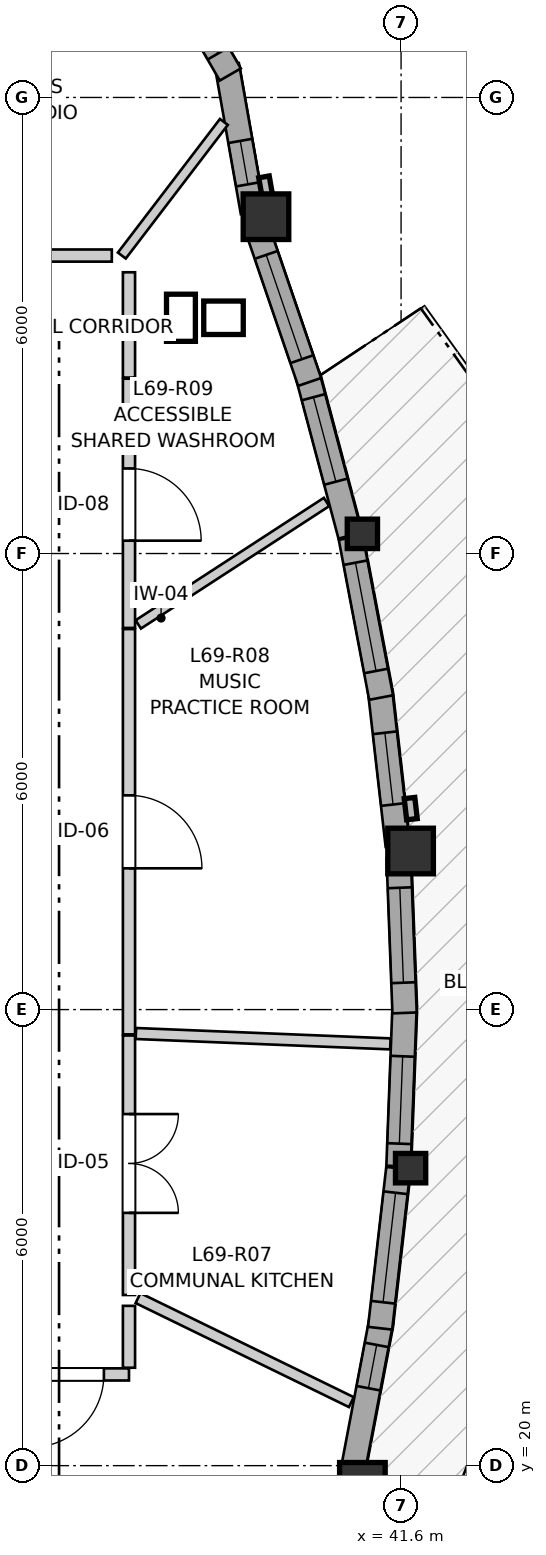
"""IFC4 building model, lengths in metres.
Left out: names, types, materials, properties, quantities, classifications, styles, units other than length and angle.
Written with IfcOpenShell. Run it as: python <this file> out.ifc"""

import sys

from ifc_helpers import new_model, si_unit, direction, frame, frame_2d, origin, origin_2d, place, context, subcontext, project, spatial, rectangle, i_section, extrude, source, transform, mapped, element, fill, save


model = new_model("IFC4")
c1 = context("Model", 3, precision=1e-05, world=origin(), true_north=direction((0.0, 1.0)))
c2 = subcontext(c1, "Body", "Model", "MODEL_VIEW")
j1 = project(units=[si_unit("LENGTHUNIT", "METRE"), si_unit("PLANEANGLEUNIT", "RADIAN")], contexts=[c1])
p1 = place(None, origin())
s1 = spatial("IfcSite", under=j1, at=p1, CompositionType="ELEMENT")
p2 = place(p1, origin())
s2 = spatial("IfcBuilding", under=s1, at=p2, CompositionType="ELEMENT")
p3 = place(p2, frame((0.0, 0.0, 230.8)))
s3 = spatial("IfcBuildingStorey", under=s2, at=p3, CompositionType="ELEMENT", Elevation=230.8)
m1 = source(origin(), c2, "Body", "SweptSolid", [
    extrude(rectangle(XDim=0.6, YDim=0.6, at=origin_2d()), origin(), (0.0, 0.0, 1.0), 2.96),
])
p4 = place(p3, frame((41.091, 19.741, 0.0), z_axis=(0.0, 0.0, 1.0), x_axis=(1.0, 0.0, 0.0)))
e1 = element("IfcColumn", 1, at=p4, inside=s3, PredefinedType="COLUMN", context=c2, shape_type="MappedRepresentation", body=[
    mapped(m1, transform((0.0, 0.0, 0.0), x_axis=(1.0, 0.0, 0.0), y_axis=(0.0, 1.0, 0.0), z_axis=(0.0, 0.0, 1.0), scale=1.0)),
])
m2 = source(origin(), c2, "Body", "SweptSolid", [
    extrude(i_section(OverallWidth=0.398, OverallDepth=0.387, WebThickness=0.019, FlangeThickness=0.03, FilletRadius=0.015, at=origin_2d()), origin(), (0.0, 0.0, 1.0), 2.96),
])
p5 = place(p3, frame((41.725, 23.914, 0.0), z_axis=(0.0, 0.0, 1.0), x_axis=(1.0, 0.0, 0.0)))
e2 = element("IfcColumn", 2, at=p5, inside=s3, PredefinedType="PILASTER", context=c2, shape_type="MappedRepresentation", body=[
    mapped(m2, transform((0.0, 0.0, 0.0), x_axis=(1.0, 0.0, 0.0), y_axis=(0.0, 1.0, 0.0), z_axis=(0.0, 0.0, 1.0), scale=1.0)),
])
p6 = place(p3, frame((41.725, 28.086, 0.0), z_axis=(0.0, 0.0, 1.0), x_axis=(1.0, 0.0, 0.0)))
e3 = element("IfcColumn", 3, at=p6, inside=s3, PredefinedType="COLUMN", context=c2, shape_type="MappedRepresentation", body=[
    mapped(m1, transform((0.0, 0.0, 0.0), x_axis=(1.0, 0.0, 0.0), y_axis=(0.0, 1.0, 0.0), z_axis=(0.0, 0.0, 1.0), scale=1.0)),
])
p7 = place(p3, frame((41.091, 32.259, 0.0), z_axis=(0.0, 0.0, 1.0), x_axis=(1.0, 0.0, 0.0)))
e4 = element("IfcColumn", 4, at=p7, inside=s3, PredefinedType="PILASTER", context=c2, shape_type="MappedRepresentation", body=[
    mapped(m2, transform((0.0, 0.0, 0.0), x_axis=(1.0, 0.0, 0.0), y_axis=(0.0, 1.0, 0.0), z_axis=(0.0, 0.0, 1.0), scale=1.0)),
])
p8 = place(p3, frame((39.823, 36.431, 0.0), z_axis=(0.0, 0.0, 1.0), x_axis=(1.0, 0.0, 0.0)))
e5 = element("IfcColumn", 5, at=p8, inside=s3, PredefinedType="COLUMN", context=c2, shape_type="MappedRepresentation", body=[
    mapped(m1, transform((0.0, 0.0, 0.0), x_axis=(1.0, 0.0, 0.0), y_axis=(0.0, 1.0, 0.0), z_axis=(0.0, 0.0, 1.0), scale=1.0)),
])
p9 = place(p3, frame((40.95, 19.86, 0.0), z_axis=(0.0, 0.0, 1.0), x_axis=(0.18667884524, 0.982420993638, 0.0)))
e6 = element("IfcWall", 6, at=p9, inside=s3, PredefinedType="SOLIDWALL", context=c2, shape_type="SweptSolid", body=[
    extrude(rectangle(XDim=2.072, YDim=0.32, at=frame_2d((1.036, 0.0))), origin(), (0.0, 0.0, 1.0), 2.58),
])
p10 = place(p9, frame((1.18, 0.0, 0.82)))
e7 = element("IfcOpeningElement", 7, at=p10, cuts=e6, PredefinedType="OPENING", context=c2, shape_type="SweptSolid", body=[
    extrude(rectangle(XDim=0.58, YDim=1.35, at=frame_2d((0.29, 0.675))), frame((0.0, 0.17, 0.0), z_axis=(0.0, -1.0, 0.0), x_axis=(1.0, 0.0, 0.0)), (0.0, 0.0, 1.0), 0.34),
])
p11 = place(p3, frame((41.324, 21.808, 0.0), z_axis=(0.0, 0.0, 1.0), x_axis=(0.113315758547, 0.993559026362, 0.0)))
e8 = element("IfcWall", 8, at=p11, inside=s3, PredefinedType="SOLIDWALL", context=c2, shape_type="SweptSolid", body=[
    extrude(rectangle(XDim=2.118, YDim=0.32, at=frame_2d((1.059, 0.0))), origin(), (0.0, 0.0, 1.0), 2.58),
])
p12 = place(p11, frame((0.344, 0.0, 0.82)))
e9 = element("IfcOpeningElement", 9, at=p12, cuts=e8, PredefinedType="OPENING", context=c2, shape_type="SweptSolid", body=[
    extrude(rectangle(XDim=1.45, YDim=1.25, at=frame_2d((0.725, 0.625))), frame((0.0, 0.17, 0.0), z_axis=(0.0, -1.0, 0.0), x_axis=(1.0, 0.0, 0.0)), (0.0, 0.0, 1.0), 0.34),
])
p13 = place(p3, frame((41.566, 23.94, 0.0), z_axis=(0.0, 0.0, 1.0), x_axis=(0.037912160544, 0.999281075615, 0.0)))
e10 = element("IfcWall", 10, at=p13, inside=s3, PredefinedType="SOLIDWALL", context=c2, shape_type="SweptSolid", body=[
    extrude(rectangle(XDim=2.106, YDim=0.32, at=frame_2d((1.053, 0.0))), origin(), (0.0, 0.0, 1.0), 2.58),
])
p14 = place(p13, frame((0.297, 0.0, 0.82)))
e11 = element("IfcOpeningElement", 11, at=p14, cuts=e10, PredefinedType="OPENING", context=c2, shape_type="SweptSolid", body=[
    extrude(rectangle(XDim=1.15, YDim=1.2, at=frame_2d((0.575, 0.6))), frame((0.0, 0.17, 0.0), z_axis=(0.0, -1.0, 0.0), x_axis=(1.0, 0.0, 0.0)), (0.0, 0.0, 1.0), 0.34),
])
p15 = place(p3, frame((41.646, 25.956, 0.0), z_axis=(0.0, 0.0, 1.0), x_axis=(-0.038018581285, 0.999277032397, 0.0)))
e12 = element("IfcWall", 12, at=p15, inside=s3, PredefinedType="SOLIDWALL", context=c2, shape_type="SweptSolid", body=[
    extrude(rectangle(XDim=2.036, YDim=0.32, at=frame_2d((1.018, 0.0))), origin(), (0.0, 0.0, 1.0), 2.58),
])
p16 = place(p15, frame((0.398, 0.0, 0.82)))
e13 = element("IfcOpeningElement", 13, at=p16, cuts=e12, PredefinedType="OPENING", context=c2, shape_type="SweptSolid", body=[
    extrude(rectangle(XDim=1.25, YDim=1.35, at=frame_2d((0.625, 0.675))), frame((0.0, 0.17, 0.0), z_axis=(0.0, -1.0, 0.0), x_axis=(1.0, 0.0, 0.0)), (0.0, 0.0, 1.0), 0.34),
])
p17 = place(p3, frame((41.556, 28.158, 0.0), z_axis=(0.0, 0.0, 1.0), x_axis=(-0.113270843693, 0.993564147888, 0.0)))
e14 = element("IfcWall", 14, at=p17, inside=s3, PredefinedType="SOLIDWALL", context=c2, shape_type="SweptSolid", body=[
    extrude(rectangle(XDim=2.048, YDim=0.32, at=frame_2d((1.024, 0.0))), origin(), (0.0, 0.0, 1.0), 2.58),
])
p18 = place(p17, frame((0.544, 0.0, 0.82)))
e15 = element("IfcOpeningElement", 15, at=p18, cuts=e14, PredefinedType="OPENING", context=c2, shape_type="SweptSolid", body=[
    extrude(rectangle(XDim=0.95, YDim=1.35, at=frame_2d((0.475, 0.675))), frame((0.0, 0.17, 0.0), z_axis=(0.0, -1.0, 0.0), x_axis=(1.0, 0.0, 0.0)), (0.0, 0.0, 1.0), 0.34),
])
p19 = place(p3, frame((41.337, 30.105, 0.0), z_axis=(0.0, 0.0, 1.0), x_axis=(-0.186614434744, 0.98243323068, 0.0)))
e16 = element("IfcWall", 16, at=p19, inside=s3, PredefinedType="SOLIDWALL", context=c2, shape_type="SweptSolid", body=[
    extrude(rectangle(XDim=2.142, YDim=0.32, at=frame_2d((1.071, 0.0))), origin(), (0.0, 0.0, 1.0), 2.58),
])
p20 = place(p19, frame((0.356, 0.0, 0.82)))
e17 = element("IfcOpeningElement", 17, at=p20, cuts=e16, PredefinedType="OPENING", context=c2, shape_type="SweptSolid", body=[
    extrude(rectangle(XDim=1.45, YDim=1.25, at=frame_2d((0.725, 0.625))), frame((0.0, 0.17, 0.0), z_axis=(0.0, -1.0, 0.0), x_axis=(1.0, 0.0, 0.0)), (0.0, 0.0, 1.0), 0.34),
])
p21 = place(p3, frame((40.931, 32.237, 0.0), z_axis=(0.0, 0.0, 1.0), x_axis=(-0.257076193941, 0.966391137433, 0.0)))
e18 = element("IfcWall", 18, at=p21, inside=s3, PredefinedType="SOLIDWALL", context=c2, shape_type="SweptSolid", body=[
    extrude(rectangle(XDim=2.177, YDim=0.32, at=frame_2d((1.088, 0.0))), origin(), (0.0, 0.0, 1.0), 2.58),
])
p22 = place(p21, frame((0.733, 0.0, 0.82)))
e19 = element("IfcOpeningElement", 19, at=p22, cuts=e18, PredefinedType="OPENING", context=c2, shape_type="SweptSolid", body=[
    extrude(rectangle(XDim=1.15, YDim=1.2, at=frame_2d((0.575, 0.6))), frame((0.0, 0.17, 0.0), z_axis=(0.0, -1.0, 0.0), x_axis=(1.0, 0.0, 0.0)), (0.0, 0.0, 1.0), 0.34),
])
p23 = place(p3, frame((40.397, 34.257, 0.0), z_axis=(0.0, 0.0, 1.0), x_axis=(-0.323634249216, 0.9461822619, 0.0)))
e20 = element("IfcWall", 20, at=p23, inside=s3, PredefinedType="SOLIDWALL", context=c2, shape_type="SweptSolid", body=[
    extrude(rectangle(XDim=2.153, YDim=0.32, at=frame_2d((1.077, 0.0))), origin(), (0.0, 0.0, 1.0), 2.58),
])
p24 = place(p23, frame((0.316, 0.0, 0.82)))
e21 = element("IfcOpeningElement", 21, at=p24, cuts=e20, PredefinedType="OPENING", context=c2, shape_type="SweptSolid", body=[
    extrude(rectangle(XDim=1.45, YDim=1.25, at=frame_2d((0.725, 0.625))), frame((0.0, 0.17, 0.0), z_axis=(0.0, -1.0, 0.0), x_axis=(1.0, 0.0, 0.0)), (0.0, 0.0, 1.0), 0.34),
])
p25 = place(p3, frame((39.649, 36.492, 0.0), z_axis=(0.0, 0.0, 1.0), x_axis=(-0.173693060482, 0.984799837906, 0.0)))
e22 = element("IfcWall", 22, at=p25, inside=s3, PredefinedType="SOLIDWALL", context=c2, shape_type="SweptSolid", body=[
    extrude(rectangle(XDim=1.962, YDim=0.32, at=frame_2d((0.981, 0.0))), origin(), (0.0, 0.0, 1.0), 2.58),
])
p26 = place(p25, frame((0.371, 0.0, 0.82)))
e23 = element("IfcOpeningElement", 23, at=p26, cuts=e22, PredefinedType="OPENING", context=c2, shape_type="SweptSolid", body=[
    extrude(rectangle(XDim=0.58, YDim=1.35, at=frame_2d((0.29, 0.675))), frame((0.0, 0.17, 0.0), z_axis=(0.0, -1.0, 0.0), x_axis=(1.0, 0.0, 0.0)), (0.0, 0.0, 1.0), 0.34),
])
p27 = place(p3, frame((39.353, 38.302, 0.0), z_axis=(0.0, 0.0, 1.0), x_axis=(-0.49990781971, 0.866078617559, 0.0)))
e24 = element("IfcWall", 24, at=p27, inside=s3, PredefinedType="SOLIDWALL", context=c2, shape_type="SweptSolid", body=[
    extrude(rectangle(XDim=2.09, YDim=0.32, at=frame_2d((1.045, 0.0))), origin(), (0.0, 0.0, 1.0), 2.58),
])
p28 = place(p27, frame((0.32, 0.0, 0.82)))
e25 = element("IfcOpeningElement", 25, at=p28, cuts=e24, PredefinedType="OPENING", context=c2, shape_type="SweptSolid", body=[
    extrude(rectangle(XDim=1.45, YDim=1.25, at=frame_2d((0.725, 0.625))), frame((0.0, 0.17, 0.0), z_axis=(0.0, -1.0, 0.0), x_axis=(1.0, 0.0, 0.0)), (0.0, 0.0, 1.0), 0.34),
])
p29 = place(p3, frame((38.02, 31.006, 0.0), z_axis=(0.0, 0.0, 1.0), x_axis=(0.0, -1.0, 0.0)))
e26 = element("IfcWall", 26, at=p29, inside=s3, PredefinedType="PARTITIONING", context=c2, shape_type="SweptSolid", body=[
    extrude(rectangle(XDim=5.332, YDim=0.16, at=frame_2d((2.666, 0.0))), origin(), (0.0, 0.0, 1.0), 2.628),
])
p30 = place(p29, frame((2.188, 0.0, 0.0)))
e27 = element("IfcOpeningElement", 27, at=p30, cuts=e26, PredefinedType="OPENING", context=c2, shape_type="SweptSolid", body=[
    extrude(rectangle(XDim=0.96, YDim=2.1, at=frame_2d((0.48, 1.05))), frame((0.0, 0.09, 0.0), z_axis=(0.0, -1.0, 0.0), x_axis=(1.0, 0.0, 0.0)), (0.0, 0.0, 1.0), 0.18),
])
p31 = place(p3, frame((38.02, 25.659, 0.0), z_axis=(0.0, 0.0, 1.0), x_axis=(0.0, -1.0, 0.0)))
e28 = element("IfcWall", 28, at=p31, inside=s3, PredefinedType="PARTITIONING", context=c2, shape_type="SweptSolid", body=[
    extrude(rectangle(XDim=3.414, YDim=0.16, at=frame_2d((1.707, 0.0))), origin(), (0.0, 0.0, 1.0), 2.628),
])
p32 = place(p31, frame((1.033, 0.0, 0.0)))
e29 = element("IfcOpeningElement", 29, at=p32, cuts=e28, PredefinedType="OPENING", context=c2, shape_type="SweptSolid", body=[
    extrude(rectangle(XDim=1.3, YDim=2.1, at=frame_2d((0.65, 1.05))), frame((0.0, 0.09, 0.0), z_axis=(0.0, -1.0, 0.0), x_axis=(1.0, 0.0, 0.0)), (0.0, 0.0, 1.0), 0.18),
])
p33 = place(p3, frame((38.02, 34.3, 0.0), z_axis=(0.0, 0.0, 1.0), x_axis=(0.0, -1.0, 0.0)))
e30 = element("IfcWall", 30, at=p33, inside=s3, PredefinedType="PARTITIONING", context=c2, shape_type="SweptSolid", body=[
    extrude(rectangle(XDim=3.279, YDim=0.16, at=frame_2d((1.64, 0.0))), origin(), (0.0, 0.0, 1.0), 2.628),
])
p34 = place(p33, frame((1.181, 0.0, 0.0)))
e31 = element("IfcOpeningElement", 31, at=p34, cuts=e30, PredefinedType="OPENING", context=c2, shape_type="SweptSolid", body=[
    extrude(rectangle(XDim=0.95, YDim=2.1, at=frame_2d((0.475, 1.05))), frame((0.0, 0.09, 0.0), z_axis=(0.0, -1.0, 0.0), x_axis=(1.0, 0.0, 0.0)), (0.0, 0.0, 1.0), 0.18),
])
p35 = place(p3, frame((38.02, 21.2, 0.0), z_axis=(0.0, 0.0, 1.0), x_axis=(-1.0, 0.0, 0.0)))
e32 = element("IfcWall", 32, at=p35, inside=s3, PredefinedType="PARTITIONING", context=c2, shape_type="SweptSolid", body=[
    extrude(rectangle(XDim=1.612, YDim=0.16, at=frame_2d((0.806, 0.0))), origin(), (0.0, 0.0, 1.0), 2.96),
])
p36 = place(p35, frame((0.33, 0.0, 0.0)))
e33 = element("IfcOpeningElement", 33, at=p36, cuts=e32, PredefinedType="OPENING", context=c2, shape_type="SweptSolid", body=[
    extrude(rectangle(XDim=0.96, YDim=2.1, at=frame_2d((0.48, 1.05))), frame((0.0, 0.09, 0.0), z_axis=(0.0, -1.0, 0.0), x_axis=(1.0, 0.0, 0.0)), (0.0, 0.0, 1.0), 0.18),
])
p37 = place(p3, frame((38.111, 25.685, 0.0), z_axis=(0.0, 0.0, 1.0), x_axis=(0.999167325882, -0.040800182477, 0.0)))
e34 = element("IfcWall", 34, at=p37, inside=s3, PredefinedType="PARTITIONING", context=c2, shape_type="SweptSolid", body=[
    extrude(rectangle(XDim=3.351, YDim=0.145, at=frame_2d((1.675, 0.0))), origin(), (0.0, 0.0, 1.0), 2.96),
])
p38 = place(p3, frame((38.139, 22.204, 0.0), z_axis=(0.0, 0.0, 1.0), x_axis=(0.898869860356, -0.43821567081, 0.0)))
e35 = element("IfcWall", 35, at=p38, inside=s3, PredefinedType="PARTITIONING", context=c2, shape_type="SweptSolid", body=[
    extrude(rectangle(XDim=3.123, YDim=0.145, at=frame_2d((1.562, 0.0))), origin(), (0.0, 0.0, 1.0), 2.96),
])
p39 = place(p3, frame((38.142, 31.067, 0.0), z_axis=(0.0, 0.0, 1.0), x_axis=(0.838351109823, 0.545130641827, 0.0)))
e36 = element("IfcWall", 36, at=p39, inside=s3, PredefinedType="PARTITIONING", context=c2, shape_type="SweptSolid", body=[
    extrude(rectangle(XDim=2.955, YDim=0.13, at=frame_2d((1.478, 0.0))), origin(), (0.0, 0.0, 1.0), 2.96),
])
p40 = place(p3, frame((37.926, 35.92, 0.0), z_axis=(0.0, 0.0, 1.0), x_axis=(0.606987113509, 0.794711673523, 0.0)))
e37 = element("IfcWall", 37, at=p40, inside=s3, PredefinedType="PARTITIONING", context=c2, shape_type="SweptSolid", body=[
    extrude(rectangle(XDim=2.212, YDim=0.13, at=frame_2d((1.106, 0.0))), origin(), (0.0, 0.0, 1.0), 2.96),
])
p41 = place(p3, frame((38.02, 34.315, 0.0), z_axis=(0.0, 0.0, 1.0), x_axis=(0.0, 1.0, 0.0)))
e38 = element("IfcWall", 38, at=p41, inside=s3, PredefinedType="PARTITIONING", context=c2, shape_type="SweptSolid", body=[
    extrude(rectangle(XDim=1.385, YDim=0.16, at=frame_2d((0.693, 0.0))), origin(), (0.0, 0.0, 1.0), 2.96),
])
p42 = place(p3, frame((36.415, 35.92, 0.0), z_axis=(0.0, 0.0, 1.0), x_axis=(1.0, 0.0, 0.0)))
e39 = element("IfcWall", 39, at=p42, inside=s3, PredefinedType="PARTITIONING", context=c2, shape_type="SweptSolid", body=[
    extrude(rectangle(XDim=1.379, YDim=0.16, at=frame_2d((0.689, 0.0))), origin(), (0.0, 0.0, 1.0), 2.598),
])
p43 = place(p3, frame((38.02, 21.288, 0.0), z_axis=(0.0, 0.0, 1.0), x_axis=(0.0, 1.0, 0.0)))
e40 = element("IfcWall", 40, at=p43, inside=s3, PredefinedType="PARTITIONING", context=c2, shape_type="SweptSolid", body=[
    extrude(rectangle(XDim=0.814, YDim=0.16, at=frame_2d((0.407, 0.0))), origin(), (0.0, 0.0, 1.0), 2.628),
])
m3 = source(origin(), c2, "Body", "SweptSolid", [
    extrude(rectangle(XDim=0.58, YDim=1.35, at=frame_2d((0.29, 0.675))), frame((0.0, 0.03, 0.0), z_axis=(0.0, -1.0, 0.0), x_axis=(1.0, 0.0, 0.0)), (0.0, 0.0, 1.0), 0.06),
])
p44 = place(p10, origin())
e41 = element("IfcWindow", 41, at=p44, inside=s3, PartitioningType="SINGLE_PANEL", PredefinedType="WINDOW", context=c2, shape_type="MappedRepresentation", body=[
    mapped(m3, transform((0.0, 0.0, 0.0), x_axis=(1.0, 0.0, 0.0), y_axis=(0.0, 1.0, 0.0), z_axis=(0.0, 0.0, 1.0), scale=1.0)),
])
fill(e7, e41)
m4 = source(origin(), c2, "Body", "SweptSolid", [
    extrude(rectangle(XDim=1.45, YDim=1.25, at=frame_2d((0.725, 0.625))), frame((0.0, 0.03, 0.0), z_axis=(0.0, -1.0, 0.0), x_axis=(1.0, 0.0, 0.0)), (0.0, 0.0, 1.0), 0.06),
])
p45 = place(p12, origin())
e42 = element("IfcWindow", 42, at=p45, inside=s3, PartitioningType="SINGLE_PANEL", PredefinedType="WINDOW", context=c2, shape_type="MappedRepresentation", body=[
    mapped(m4, transform((0.0, 0.0, 0.0), x_axis=(1.0, 0.0, 0.0), y_axis=(0.0, 1.0, 0.0), z_axis=(0.0, 0.0, 1.0), scale=1.0)),
])
fill(e9, e42)
m5 = source(origin(), c2, "Body", "SweptSolid", [
    extrude(rectangle(XDim=1.15, YDim=1.2, at=frame_2d((0.575, 0.6))), frame((0.0, 0.03, 0.0), z_axis=(0.0, -1.0, 0.0), x_axis=(1.0, 0.0, 0.0)), (0.0, 0.0, 1.0), 0.06),
])
p46 = place(p14, origin())
e43 = element("IfcWindow", 43, at=p46, inside=s3, PartitioningType="SINGLE_PANEL", PredefinedType="WINDOW", context=c2, shape_type="MappedRepresentation", body=[
    mapped(m5, transform((0.0, 0.0, 0.0), x_axis=(1.0, 0.0, 0.0), y_axis=(0.0, 1.0, 0.0), z_axis=(0.0, 0.0, 1.0), scale=1.0)),
])
fill(e11, e43)
m6 = source(origin(), c2, "Body", "SweptSolid", [
    extrude(rectangle(XDim=1.25, YDim=1.35, at=frame_2d((0.625, 0.675))), frame((0.0, 0.03, 0.0), z_axis=(0.0, -1.0, 0.0), x_axis=(1.0, 0.0, 0.0)), (0.0, 0.0, 1.0), 0.06),
])
p47 = place(p16, origin())
e44 = element("IfcWindow", 44, at=p47, inside=s3, PartitioningType="SINGLE_PANEL", PredefinedType="WINDOW", context=c2, shape_type="MappedRepresentation", body=[
    mapped(m6, transform((0.0, 0.0, 0.0), x_axis=(1.0, 0.0, 0.0), y_axis=(0.0, 1.0, 0.0), z_axis=(0.0, 0.0, 1.0), scale=1.0)),
])
fill(e13, e44)
m7 = source(origin(), c2, "Body", "SweptSolid", [
    extrude(rectangle(XDim=0.95, YDim=1.35, at=frame_2d((0.475, 0.675))), frame((0.0, 0.03, 0.0), z_axis=(0.0, -1.0, 0.0), x_axis=(1.0, 0.0, 0.0)), (0.0, 0.0, 1.0), 0.06),
])
p48 = place(p18, origin())
e45 = element("IfcWindow", 45, at=p48, inside=s3, PartitioningType="SINGLE_PANEL", PredefinedType="WINDOW", context=c2, shape_type="MappedRepresentation", body=[
    mapped(m7, transform((0.0, 0.0, 0.0), x_axis=(1.0, 0.0, 0.0), y_axis=(0.0, 1.0, 0.0), z_axis=(0.0, 0.0, 1.0), scale=1.0)),
])
fill(e15, e45)
p49 = place(p20, origin())
e46 = element("IfcWindow", 46, at=p49, inside=s3, PartitioningType="SINGLE_PANEL", PredefinedType="WINDOW", context=c2, shape_type="MappedRepresentation", body=[
    mapped(m4, transform((0.0, 0.0, 0.0), x_axis=(1.0, 0.0, 0.0), y_axis=(0.0, 1.0, 0.0), z_axis=(0.0, 0.0, 1.0), scale=1.0)),
])
fill(e17, e46)
p50 = place(p22, origin())
e47 = element("IfcWindow", 47, at=p50, inside=s3, PartitioningType="SINGLE_PANEL", PredefinedType="WINDOW", context=c2, shape_type="MappedRepresentation", body=[
    mapped(m5, transform((0.0, 0.0, 0.0), x_axis=(1.0, 0.0, 0.0), y_axis=(0.0, 1.0, 0.0), z_axis=(0.0, 0.0, 1.0), scale=1.0)),
])
fill(e19, e47)
p51 = place(p24, origin())
e48 = element("IfcWindow", 48, at=p51, inside=s3, PartitioningType="SINGLE_PANEL", PredefinedType="WINDOW", context=c2, shape_type="MappedRepresentation", body=[
    mapped(m4, transform((0.0, 0.0, 0.0), x_axis=(1.0, 0.0, 0.0), y_axis=(0.0, 1.0, 0.0), z_axis=(0.0, 0.0, 1.0), scale=1.0)),
])
fill(e21, e48)
p52 = place(p26, origin())
e49 = element("IfcWindow", 49, at=p52, inside=s3, PartitioningType="SINGLE_PANEL", PredefinedType="WINDOW", context=c2, shape_type="MappedRepresentation", body=[
    mapped(m3, transform((0.0, 0.0, 0.0), x_axis=(1.0, 0.0, 0.0), y_axis=(0.0, 1.0, 0.0), z_axis=(0.0, 0.0, 1.0), scale=1.0)),
])
fill(e23, e49)
p53 = place(p28, origin())
e50 = element("IfcWindow", 50, at=p53, inside=s3, PartitioningType="SINGLE_PANEL", PredefinedType="WINDOW", context=c2, shape_type="MappedRepresentation", body=[
    mapped(m4, transform((0.0, 0.0, 0.0), x_axis=(1.0, 0.0, 0.0), y_axis=(0.0, 1.0, 0.0), z_axis=(0.0, 0.0, 1.0), scale=1.0)),
])
fill(e25, e50)
m8 = source(origin(), c2, "Body", "SweptSolid", [
    extrude(rectangle(XDim=0.96, YDim=2.1, at=frame_2d((0.48, 1.05))), frame((0.0, 0.025, 0.0), z_axis=(0.0, -1.0, 0.0), x_axis=(1.0, 0.0, 0.0)), (0.0, 0.0, 1.0), 0.05),
])
p54 = place(p30, origin())
e51 = element("IfcDoor", 51, at=p54, inside=s3, OperationType="SINGLE_SWING_RIGHT", PredefinedType="DOOR", context=c2, shape_type="MappedRepresentation", body=[
    mapped(m8, transform((0.0, 0.0, 0.0), x_axis=(1.0, 0.0, 0.0), y_axis=(0.0, 1.0, 0.0), z_axis=(0.0, 0.0, 1.0), scale=1.0)),
])
fill(e27, e51)
m9 = source(origin(), c2, "Body", "SweptSolid", [
    extrude(rectangle(XDim=1.3, YDim=2.1, at=frame_2d((0.65, 1.05))), frame((0.0, 0.025, 0.0), z_axis=(0.0, -1.0, 0.0), x_axis=(1.0, 0.0, 0.0)), (0.0, 0.0, 1.0), 0.05),
])
p55 = place(p32, origin())
e52 = element("IfcDoor", 52, at=p55, inside=s3, OperationType="DOUBLE_DOOR_SINGLE_SWING", PredefinedType="DOOR", context=c2, shape_type="MappedRepresentation", body=[
    mapped(m9, transform((0.0, 0.0, 0.0), x_axis=(1.0, 0.0, 0.0), y_axis=(0.0, 1.0, 0.0), z_axis=(0.0, 0.0, 1.0), scale=1.0)),
])
fill(e29, e52)
m10 = source(origin(), c2, "Body", "SweptSolid", [
    extrude(rectangle(XDim=0.95, YDim=2.1, at=frame_2d((0.475, 1.05))), frame((0.0, 0.025, 0.0), z_axis=(0.0, -1.0, 0.0), x_axis=(1.0, 0.0, 0.0)), (0.0, 0.0, 1.0), 0.05),
])
p56 = place(p34, origin())
e53 = element("IfcDoor", 53, at=p56, inside=s3, OperationType="SINGLE_SWING_RIGHT", PredefinedType="DOOR", context=c2, shape_type="MappedRepresentation", body=[
    mapped(m10, transform((0.0, 0.0, 0.0), x_axis=(1.0, 0.0, 0.0), y_axis=(0.0, 1.0, 0.0), z_axis=(0.0, 0.0, 1.0), scale=1.0)),
])
fill(e31, e53)
p57 = place(p36, origin())
e54 = element("IfcDoor", 54, at=p57, inside=s3, OperationType="SINGLE_SWING_RIGHT", PredefinedType="DOOR", context=c2, shape_type="MappedRepresentation", body=[
    mapped(m8, transform((0.0, 0.0, 0.0), x_axis=(1.0, 0.0, 0.0), y_axis=(0.0, 1.0, 0.0), z_axis=(0.0, 0.0, 1.0), scale=1.0)),
])
fill(e33, e54)
save(model, sys.argv[1])
